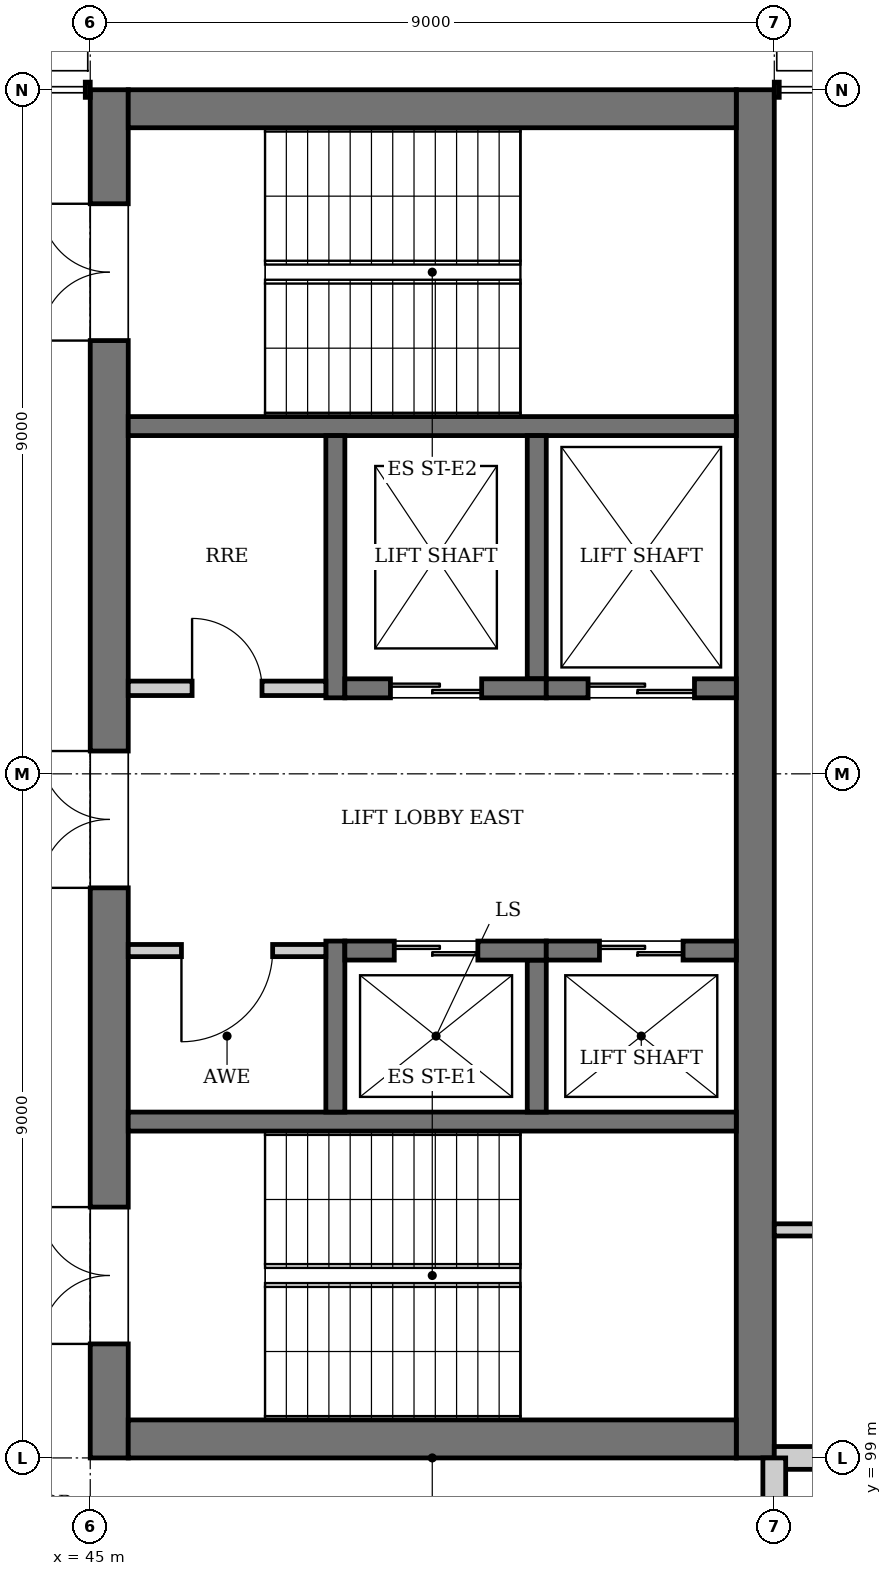
"""IFC4 building model, lengths in metres.
Left out: names, types, materials, properties, quantities, classifications, styles, units other than length and angle.
Written with IfcOpenShell. Run it as: python <this file> out.ifc"""

import sys

from ifc_helpers import new_model, si_unit, direction, frame, frame_2d, origin, place, context, subcontext, project, spatial, rectangle, extrude, element, fill, save


model = new_model("IFC4")
c1 = context("Model", 3, precision=1e-05, world=origin(), true_north=direction((0.0, 1.0)))
c2 = subcontext(c1, "Body", "Model", "MODEL_VIEW")
j1 = project(units=[si_unit("LENGTHUNIT", "METRE"), si_unit("PLANEANGLEUNIT", "RADIAN")], contexts=[c1])
p1 = place(None, origin())
s1 = spatial("IfcSite", under=j1, at=p1, CompositionType="ELEMENT")
p2 = place(p1, origin())
s2 = spatial("IfcBuilding", under=s1, at=p2, CompositionType="ELEMENT")
p3 = place(p2, frame((0.0, 0.0, 10.5)))
s3 = spatial("IfcBuildingStorey", under=s2, at=p3, CompositionType="ELEMENT", Elevation=10.5)
p4 = place(p3, frame((45.25, 99.0, 0.0), z_axis=(0.0, 0.0, 1.0), x_axis=(0.0, 1.0, 0.0)))
e1 = element("IfcWall", 1, at=p4, inside=s3, PredefinedType="SHEAR", context=c2, shape_type="SweptSolid", body=[
    extrude(rectangle(XDim=18.0, YDim=0.5, at=frame_2d((9.0, 0.0))), origin(), (0.0, 0.0, 1.0), 4.5),
])
p5 = place(p4, frame((1.5, 0.0, 0.0)))
e2 = element("IfcOpeningElement", 2, at=p5, cuts=e1, PredefinedType="OPENING", context=c2, shape_type="SweptSolid", body=[
    extrude(rectangle(XDim=1.8, YDim=2.1, at=frame_2d((0.9, 1.05))), frame((0.0, 0.26, 0.0), z_axis=(0.0, -1.0, 0.0), x_axis=(1.0, 0.0, 0.0)), (0.0, 0.0, 1.0), 0.52),
])
p6 = place(p4, frame((14.7, 0.0, 0.0)))
e3 = element("IfcOpeningElement", 3, at=p6, cuts=e1, PredefinedType="OPENING", context=c2, shape_type="SweptSolid", body=[
    extrude(rectangle(XDim=1.8, YDim=2.1, at=frame_2d((0.9, 1.05))), frame((0.0, 0.26, 0.0), z_axis=(0.0, -1.0, 0.0), x_axis=(1.0, 0.0, 0.0)), (0.0, 0.0, 1.0), 0.52),
])
p7 = place(p4, frame((7.5, 0.0, 0.0)))
e4 = element("IfcOpeningElement", 4, at=p7, cuts=e1, PredefinedType="OPENING", context=c2, shape_type="SweptSolid", body=[
    extrude(rectangle(XDim=1.8, YDim=2.1, at=frame_2d((0.9, 1.05))), frame((0.0, 0.26, 0.0), z_axis=(0.0, -1.0, 0.0), x_axis=(1.0, 0.0, 0.0)), (0.0, 0.0, 1.0), 0.52),
])
p8 = place(p3, frame((53.75, 99.0, 0.0), z_axis=(0.0, 0.0, 1.0), x_axis=(0.0, 1.0, 0.0)))
e5 = element("IfcWall", 5, at=p8, inside=s3, PredefinedType="SHEAR", context=c2, shape_type="SweptSolid", body=[
    extrude(rectangle(XDim=18.0, YDim=0.5, at=frame_2d((9.0, 0.0))), origin(), (0.0, 0.0, 1.0), 4.5),
])
for number, where, z_axis, x_axis in (
    (6, (45.5, 99.25, 0.0), (0.0, 0.0, 1.0), (1.0, 0.0, 0.0)),
    (7, (45.5, 116.75, 0.0), (0.0, 0.0, 1.0), (1.0, 0.0, 0.0)),
):
    element("IfcWall", number, at=place(p3, frame(where, z_axis=z_axis, x_axis=x_axis)), inside=s3, PredefinedType="SHEAR", context=c2, shape_type="SweptSolid", body=[
        extrude(rectangle(XDim=8.0, YDim=0.5, at=frame_2d((4.0, 0.0))), origin(), (0.0, 0.0, 1.0), 4.5),
    ])
p9 = place(p3, frame((54.0, 99.0, 0.0), z_axis=(0.0, 0.0, 1.0), x_axis=(1.0, 0.0, 0.0)))
e8 = element("IfcWall", 8, at=p9, inside=s3, PredefinedType="PARTITIONING", context=c2, shape_type="SweptSolid", body=[
    extrude(rectangle(XDim=8.87, YDim=0.3, at=frame_2d((4.435, 0.0))), origin(), (0.0, 0.0, 1.0), 3.822),
])
p10 = place(p9, frame((3.8, 0.0, 0.0)))
e9 = element("IfcOpeningElement", 9, at=p10, cuts=e8, PredefinedType="OPENING", context=c2, shape_type="SweptSolid", body=[
    extrude(rectangle(XDim=1.2, YDim=2.4, at=frame_2d((0.6, 1.2))), frame((0.0, 0.16, 0.0), z_axis=(0.0, -1.0, 0.0), x_axis=(1.0, 0.0, 0.0)), (0.0, 0.0, 1.0), 0.32),
])
p11 = place(p3, frame((54.0, 102.0, 0.0), z_axis=(0.0, 0.0, 1.0), x_axis=(1.0, 0.0, 0.0)))
e10 = element("IfcWall", 10, at=p11, inside=s3, PredefinedType="PARTITIONING", context=c2, shape_type="SweptSolid", body=[
    extrude(rectangle(XDim=9.08, YDim=0.16, at=frame_2d((4.54, 0.0))), origin(), (0.0, 0.0, 1.0), 3.998),
])
p12 = place(p11, frame((3.8, 0.0, 0.0)))
e11 = element("IfcOpeningElement", 11, at=p12, cuts=e10, PredefinedType="OPENING", context=c2, shape_type="SweptSolid", body=[
    extrude(rectangle(XDim=1.5, YDim=2.1, at=frame_2d((0.75, 1.05))), frame((0.0, 0.09, 0.0), z_axis=(0.0, -1.0, 0.0), x_axis=(1.0, 0.0, 0.0)), (0.0, 0.0, 1.0), 0.18),
])
p13 = place(p3, frame((54.0, 96.08, 0.0), z_axis=(0.0, 0.0, 1.0), x_axis=(0.0, 1.0, 0.0)))
e12 = element("IfcWall", 12, at=p13, inside=s3, PredefinedType="PARTITIONING", context=c2, shape_type="SweptSolid", body=[
    extrude(rectangle(XDim=2.92, YDim=0.3, at=frame_2d((1.46, 0.0))), origin(), (0.0, 0.0, 1.0), 3.822),
])
for number, where, z_axis, x_axis in (
    (13, (45.5, 103.425, 0.0), (0.0, 0.0, 1.0), (1.0, 0.0, 0.0)),
    (14, (45.5, 112.575, 0.0), (0.0, 0.0, 1.0), (1.0, 0.0, 0.0)),
):
    element("IfcWall", number, at=place(p3, frame(where, z_axis=z_axis, x_axis=x_axis)), inside=s3, PredefinedType="SOLIDWALL", context=c2, shape_type="SweptSolid", body=[
        extrude(rectangle(XDim=8.0, YDim=0.25, at=frame_2d((4.0, 0.0))), origin(), (0.0, 0.0, 1.0), 4.25),
    ])
p14 = place(p3, frame((48.225, 103.55, 0.0), z_axis=(0.0, 0.0, 1.0), x_axis=(0.0, 1.0, 0.0)))
e15 = element("IfcWall", 15, at=p14, inside=s3, PredefinedType="SOLIDWALL", context=c2, shape_type="SweptSolid", body=[
    extrude(rectangle(XDim=2.25, YDim=0.25, at=frame_2d((1.125, 0.0))), origin(), (0.0, 0.0, 1.0), 4.5),
])
p15 = place(p3, frame((50.875, 103.55, 0.0), z_axis=(0.0, 0.0, 1.0), x_axis=(0.0, 1.0, 0.0)))
e16 = element("IfcWall", 16, at=p15, inside=s3, PredefinedType="SOLIDWALL", context=c2, shape_type="SweptSolid", body=[
    extrude(rectangle(XDim=2.0, YDim=0.25, at=frame_2d((1.0, 0.0))), origin(), (0.0, 0.0, 1.0), 4.5),
])
p16 = place(p3, frame((48.35, 105.675, 0.0), z_axis=(0.0, 0.0, 1.0), x_axis=(1.0, 0.0, 0.0)))
e17 = element("IfcWall", 17, at=p16, inside=s3, PredefinedType="SOLIDWALL", context=c2, shape_type="SweptSolid", body=[
    extrude(rectangle(XDim=2.65, YDim=0.25, at=frame_2d((1.325, 0.0))), origin(), (0.0, 0.0, 1.0), 4.5),
])
p17 = place(p16, frame((0.65, 0.0, 0.0)))
e18 = element("IfcOpeningElement", 18, at=p17, cuts=e17, PredefinedType="OPENING", context=c2, shape_type="SweptSolid", body=[
    extrude(rectangle(XDim=1.1, YDim=2.1, at=frame_2d((0.55, 1.05))), frame((0.0, 0.135, 0.0), z_axis=(0.0, -1.0, 0.0), x_axis=(1.0, 0.0, 0.0)), (0.0, 0.0, 1.0), 0.27),
])
p18 = place(p3, frame((51.0, 105.675, 0.0), z_axis=(0.0, 0.0, 1.0), x_axis=(1.0, 0.0, 0.0)))
e19 = element("IfcWall", 19, at=p18, inside=s3, PredefinedType="SOLIDWALL", context=c2, shape_type="SweptSolid", body=[
    extrude(rectangle(XDim=2.5, YDim=0.25, at=frame_2d((1.25, 0.0))), origin(), (0.0, 0.0, 1.0), 4.5),
])
p19 = place(p18, frame((0.7, 0.0, 0.0)))
e20 = element("IfcOpeningElement", 20, at=p19, cuts=e19, PredefinedType="OPENING", context=c2, shape_type="SweptSolid", body=[
    extrude(rectangle(XDim=1.1, YDim=2.1, at=frame_2d((0.55, 1.05))), frame((0.0, 0.135, 0.0), z_axis=(0.0, -1.0, 0.0), x_axis=(1.0, 0.0, 0.0)), (0.0, 0.0, 1.0), 0.27),
])
p20 = place(p3, frame((48.225, 109.0, 0.0), z_axis=(0.0, 0.0, 1.0), x_axis=(0.0, 1.0, 0.0)))
e21 = element("IfcWall", 21, at=p20, inside=s3, PredefinedType="SOLIDWALL", context=c2, shape_type="SweptSolid", body=[
    extrude(rectangle(XDim=3.45, YDim=0.25, at=frame_2d((1.725, 0.0))), origin(), (0.0, 0.0, 1.0), 4.5),
])
p21 = place(p3, frame((50.875, 109.25, 0.0), z_axis=(0.0, 0.0, 1.0), x_axis=(0.0, 1.0, 0.0)))
e22 = element("IfcWall", 22, at=p21, inside=s3, PredefinedType="SOLIDWALL", context=c2, shape_type="SweptSolid", body=[
    extrude(rectangle(XDim=3.2, YDim=0.25, at=frame_2d((1.6, 0.0))), origin(), (0.0, 0.0, 1.0), 4.5),
])
p22 = place(p3, frame((48.35, 109.125, 0.0), z_axis=(0.0, 0.0, 1.0), x_axis=(1.0, 0.0, 0.0)))
e23 = element("IfcWall", 23, at=p22, inside=s3, PredefinedType="SOLIDWALL", context=c2, shape_type="SweptSolid", body=[
    extrude(rectangle(XDim=2.65, YDim=0.25, at=frame_2d((1.325, 0.0))), origin(), (0.0, 0.0, 1.0), 4.5),
])
p23 = place(p22, frame((0.6, 0.0, 0.0)))
e24 = element("IfcOpeningElement", 24, at=p23, cuts=e23, PredefinedType="OPENING", context=c2, shape_type="SweptSolid", body=[
    extrude(rectangle(XDim=1.2, YDim=2.1, at=frame_2d((0.6, 1.05))), frame((0.0, 0.135, 0.0), z_axis=(0.0, -1.0, 0.0), x_axis=(1.0, 0.0, 0.0)), (0.0, 0.0, 1.0), 0.27),
])
p24 = place(p3, frame((51.0, 109.125, 0.0), z_axis=(0.0, 0.0, 1.0), x_axis=(1.0, 0.0, 0.0)))
e25 = element("IfcWall", 25, at=p24, inside=s3, PredefinedType="SOLIDWALL", context=c2, shape_type="SweptSolid", body=[
    extrude(rectangle(XDim=2.5, YDim=0.25, at=frame_2d((1.25, 0.0))), origin(), (0.0, 0.0, 1.0), 4.5),
])
p25 = place(p24, frame((0.55, 0.0, 0.0)))
e26 = element("IfcOpeningElement", 26, at=p25, cuts=e25, PredefinedType="OPENING", context=c2, shape_type="SweptSolid", body=[
    extrude(rectangle(XDim=1.4, YDim=2.4, at=frame_2d((0.7, 1.2))), frame((0.0, 0.135, 0.0), z_axis=(0.0, -1.0, 0.0), x_axis=(1.0, 0.0, 0.0)), (0.0, 0.0, 1.0), 0.27),
])
p26 = place(p3, frame((45.5, 105.675, 0.0), z_axis=(0.0, 0.0, 1.0), x_axis=(1.0, 0.0, 0.0)))
e27 = element("IfcWall", 27, at=p26, inside=s3, PredefinedType="PARTITIONING", context=c2, shape_type="SweptSolid", body=[
    extrude(rectangle(XDim=2.6, YDim=0.16, at=frame_2d((1.3, 0.0))), origin(), (0.0, 0.0, 1.0), 4.25),
])
p27 = place(p26, frame((0.7, 0.0, 0.0)))
e28 = element("IfcOpeningElement", 28, at=p27, cuts=e27, PredefinedType="OPENING", context=c2, shape_type="SweptSolid", body=[
    extrude(rectangle(XDim=1.2, YDim=2.1, at=frame_2d((0.6, 1.05))), frame((0.0, 0.09, 0.0), z_axis=(0.0, -1.0, 0.0), x_axis=(1.0, 0.0, 0.0)), (0.0, 0.0, 1.0), 0.18),
])
p28 = place(p3, frame((45.5, 109.125, 0.0), z_axis=(0.0, 0.0, 1.0), x_axis=(1.0, 0.0, 0.0)))
e29 = element("IfcWall", 29, at=p28, inside=s3, PredefinedType="PARTITIONING", context=c2, shape_type="SweptSolid", body=[
    extrude(rectangle(XDim=2.6, YDim=0.19, at=frame_2d((1.3, 0.0))), origin(), (0.0, 0.0, 1.0), 4.25),
])
p29 = place(p28, frame((0.84, 0.0, 0.0)))
e30 = element("IfcOpeningElement", 30, at=p29, cuts=e29, PredefinedType="OPENING", context=c2, shape_type="SweptSolid", body=[
    extrude(rectangle(XDim=0.92, YDim=2.1, at=frame_2d((0.46, 1.05))), frame((0.0, 0.105, 0.0), z_axis=(0.0, -1.0, 0.0), x_axis=(1.0, 0.0, 0.0)), (0.0, 0.0, 1.0), 0.21),
])
p30 = place(p17, origin())
e31 = element("IfcDoor", 31, at=p30, inside=s3, OperationType="DOUBLE_DOOR_SLIDING", PredefinedType="DOOR", context=c2, shape_type="SweptSolid", body=[
    extrude(rectangle(XDim=1.1, YDim=2.1, at=frame_2d((0.55, 1.05))), frame((0.0, 0.025, 0.0), z_axis=(0.0, -1.0, 0.0), x_axis=(1.0, 0.0, 0.0)), (0.0, 0.0, 1.0), 0.05),
])
fill(e18, e31)
p31 = place(p19, origin())
e32 = element("IfcDoor", 32, at=p31, inside=s3, OperationType="DOUBLE_DOOR_SLIDING", PredefinedType="DOOR", context=c2, shape_type="SweptSolid", body=[
    extrude(rectangle(XDim=1.1, YDim=2.1, at=frame_2d((0.55, 1.05))), frame((0.0, 0.025, 0.0), z_axis=(0.0, -1.0, 0.0), x_axis=(1.0, 0.0, 0.0)), (0.0, 0.0, 1.0), 0.05),
])
fill(e20, e32)
p32 = place(p23, origin())
e33 = element("IfcDoor", 33, at=p32, inside=s3, OperationType="DOUBLE_DOOR_SLIDING", PredefinedType="DOOR", context=c2, shape_type="SweptSolid", body=[
    extrude(rectangle(XDim=1.2, YDim=2.1, at=frame_2d((0.6, 1.05))), frame((0.0, 0.025, 0.0), z_axis=(0.0, -1.0, 0.0), x_axis=(1.0, 0.0, 0.0)), (0.0, 0.0, 1.0), 0.05),
])
fill(e24, e33)
p33 = place(p25, origin())
e34 = element("IfcDoor", 34, at=p33, inside=s3, OperationType="DOUBLE_DOOR_SLIDING", PredefinedType="DOOR", context=c2, shape_type="SweptSolid", body=[
    extrude(rectangle(XDim=1.4, YDim=2.4, at=frame_2d((0.7, 1.2))), frame((0.0, 0.025, 0.0), z_axis=(0.0, -1.0, 0.0), x_axis=(1.0, 0.0, 0.0)), (0.0, 0.0, 1.0), 0.05),
])
fill(e26, e34)
p34 = place(p5, origin())
e35 = element("IfcDoor", 35, at=p34, inside=s3, OperationType="DOUBLE_DOOR_SINGLE_SWING", PredefinedType="DOOR", context=c2, shape_type="SweptSolid", body=[
    extrude(rectangle(XDim=1.8, YDim=2.1, at=frame_2d((0.9, 1.05))), frame((0.0, 0.025, 0.0), z_axis=(0.0, -1.0, 0.0), x_axis=(1.0, 0.0, 0.0)), (0.0, 0.0, 1.0), 0.05),
])
fill(e2, e35)
p35 = place(p6, origin())
e36 = element("IfcDoor", 36, at=p35, inside=s3, OperationType="DOUBLE_DOOR_SINGLE_SWING", PredefinedType="DOOR", context=c2, shape_type="SweptSolid", body=[
    extrude(rectangle(XDim=1.8, YDim=2.1, at=frame_2d((0.9, 1.05))), frame((0.0, 0.025, 0.0), z_axis=(0.0, -1.0, 0.0), x_axis=(1.0, 0.0, 0.0)), (0.0, 0.0, 1.0), 0.05),
])
fill(e3, e36)
p36 = place(p7, origin())
e37 = element("IfcDoor", 37, at=p36, inside=s3, OperationType="DOUBLE_DOOR_SINGLE_SWING", PredefinedType="DOOR", context=c2, shape_type="SweptSolid", body=[
    extrude(rectangle(XDim=1.8, YDim=2.1, at=frame_2d((0.9, 1.05))), frame((0.0, 0.025, 0.0), z_axis=(0.0, -1.0, 0.0), x_axis=(1.0, 0.0, 0.0)), (0.0, 0.0, 1.0), 0.05),
])
fill(e4, e37)
p37 = place(p27, frame((1.2, 0.0, 0.0), z_axis=(0.0, 0.0, 1.0), x_axis=(-1.0, 0.0, 0.0)))
e38 = element("IfcDoor", 38, at=p37, inside=s3, OperationType="SINGLE_SWING_RIGHT", PredefinedType="DOOR", context=c2, shape_type="SweptSolid", body=[
    extrude(rectangle(XDim=1.2, YDim=2.1, at=frame_2d((0.6, 1.05))), frame((0.0, 0.025, 0.0), z_axis=(0.0, -1.0, 0.0), x_axis=(1.0, 0.0, 0.0)), (0.0, 0.0, 1.0), 0.05),
])
fill(e28, e38)
p38 = place(p29, origin())
e39 = element("IfcDoor", 39, at=p38, inside=s3, OperationType="SINGLE_SWING_LEFT", PredefinedType="DOOR", context=c2, shape_type="SweptSolid", body=[
    extrude(rectangle(XDim=0.92, YDim=2.1, at=frame_2d((0.46, 1.05))), frame((0.0, 0.025, 0.0), z_axis=(0.0, -1.0, 0.0), x_axis=(1.0, 0.0, 0.0)), (0.0, 0.0, 1.0), 0.05),
])
fill(e30, e39)
save(model, sys.argv[1])
